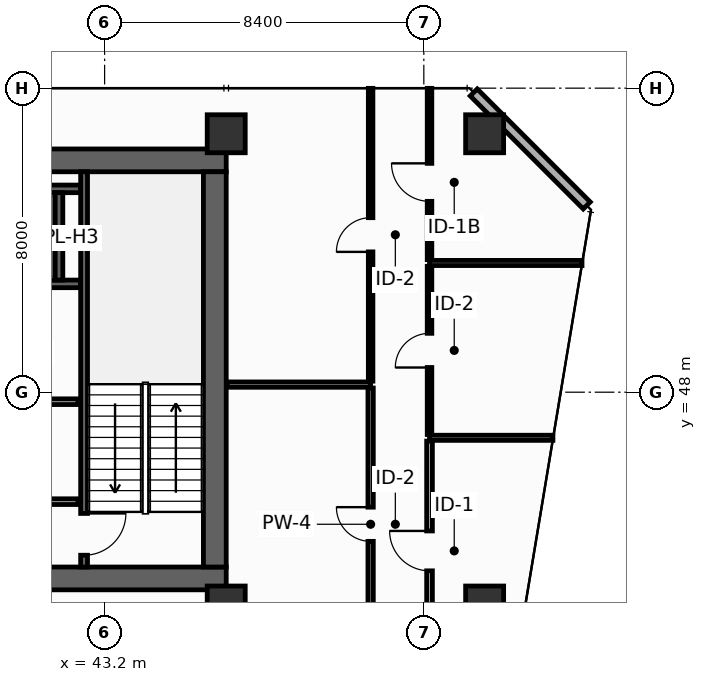
"""IFC4 building model, lengths in metres.
Left out: names, types, materials, properties, quantities, classifications, styles, units other than length and angle.
Written with IfcOpenShell. Run it as: python <this file> out.ifc"""

import sys

from ifc_helpers import new_model, si_unit, direction, frame, frame_2d, origin, origin_2d, place, context, subcontext, project, spatial, rectangle, hollow_rectangle, extrude, element, fill, save


model = new_model("IFC4")
c1 = context("Model", 3, precision=1e-05, world=origin(), true_north=direction((0.0, 1.0)))
c2 = subcontext(c1, "Body", "Model", "MODEL_VIEW")
j1 = project(units=[si_unit("LENGTHUNIT", "METRE"), si_unit("PLANEANGLEUNIT", "RADIAN")], contexts=[c1])
p1 = place(None, origin())
s1 = spatial("IfcSite", under=j1, at=p1, CompositionType="ELEMENT")
p2 = place(p1, origin())
s2 = spatial("IfcBuilding", under=s1, at=p2, CompositionType="ELEMENT")
p3 = place(p2, frame((0.0, 0.0, 119.2)))
s3 = spatial("IfcBuildingStorey", under=s2, at=p3, CompositionType="ELEMENT", Elevation=119.2)
p4 = place(p3, frame((13.5, 43.1, 0.0), z_axis=(0.0, 0.0, 1.0), x_axis=(1.0, 0.0, 0.0)))
e1 = element("IfcWall", 1, at=p4, inside=s3, PredefinedType="SHEAR", context=c2, shape_type="SweptSolid", body=[
    extrude(rectangle(XDim=32.9, YDim=0.6, at=frame_2d((16.45, 0.0))), origin(), (0.0, 0.0, 1.0), 3.95),
])
p5 = place(p4, frame((5.4, 0.0, 0.0)))
e2 = element("IfcOpeningElement", 2, at=p5, cuts=e1, PredefinedType="OPENING", context=c2, shape_type="SweptSolid", body=[
    extrude(rectangle(XDim=1.1, YDim=2.15, at=frame_2d((0.55, 1.075))), frame((0.0, 0.31, 0.0), z_axis=(0.0, -1.0, 0.0), x_axis=(1.0, 0.0, 0.0)), (0.0, 0.0, 1.0), 0.62),
])
p6 = place(p4, frame((25.6, 0.0, 0.0)))
e3 = element("IfcOpeningElement", 3, at=p6, cuts=e1, PredefinedType="OPENING", context=c2, shape_type="SweptSolid", body=[
    extrude(rectangle(XDim=1.1, YDim=2.15, at=frame_2d((0.55, 1.075))), frame((0.0, 0.31, 0.0), z_axis=(0.0, -1.0, 0.0), x_axis=(1.0, 0.0, 0.0)), (0.0, 0.0, 1.0), 0.62),
])
p7 = place(p3, frame((13.5, 54.1, 0.0), z_axis=(0.0, 0.0, 1.0), x_axis=(1.0, 0.0, 0.0)))
e4 = element("IfcWall", 4, at=p7, inside=s3, PredefinedType="SHEAR", context=c2, shape_type="SweptSolid", body=[
    extrude(rectangle(XDim=32.9, YDim=0.6, at=frame_2d((16.45, 0.0))), origin(), (0.0, 0.0, 1.0), 3.95),
])
p8 = place(p3, frame((46.1, 43.4, 0.0), z_axis=(0.0, 0.0, 1.0), x_axis=(0.0, 1.0, 0.0)))
e5 = element("IfcWall", 5, at=p8, inside=s3, PredefinedType="SHEAR", context=c2, shape_type="SweptSolid", body=[
    extrude(rectangle(XDim=10.4, YDim=0.6, at=frame_2d((5.2, 0.0))), origin(), (0.0, 0.0, 1.0), 3.95),
])
for number, where, z_axis, x_axis in (
    (6, (46.4, 54.8, 0.0), (0.0, 0.0, 1.0), (1.0, 0.0, 0.0)),
    (7, (53.2, 54.8, 0.0), (0.0, 0.0, 1.0), (1.0, 0.0, 0.0)),
    (8, (46.4, 42.4, 0.0), (0.0, 0.0, 1.0), (1.0, 0.0, 0.0)),
    (9, (53.2, 42.4, 0.0), (0.0, 0.0, 1.0), (1.0, 0.0, 0.0)),
):
    element("IfcColumn", number, at=place(p3, frame(where, z_axis=z_axis, x_axis=x_axis)), inside=s3, PredefinedType="COLUMN", context=c2, shape_type="SweptSolid", body=[
        extrude(hollow_rectangle(XDim=1.0, YDim=1.0, WallThickness=0.045, at=origin_2d()), origin(), (0.0, 0.0, 1.0), 4.4),
    ])
p9 = place(p3, frame((39.525, 50.85, 0.0), z_axis=(0.0, 0.0, 1.0), x_axis=(1.0, 0.0, 0.0)))
e10 = element("IfcWall", 10, at=p9, inside=s3, PredefinedType="SHEAR", context=c2, shape_type="SweptSolid", body=[
    extrude(rectangle(XDim=3.045, YDim=0.2, at=frame_2d((1.522, 0.0))), origin(), (0.0, 0.0, 1.0), 3.95),
])
p10 = place(p9, frame((0.825, 0.0, 0.0)))
e11 = element("IfcOpeningElement", 11, at=p10, cuts=e10, PredefinedType="OPENING", context=c2, shape_type="SweptSolid", body=[
    extrude(rectangle(XDim=1.1, YDim=2.2, at=frame_2d((0.55, 1.1))), frame((0.0, 0.11, 0.0), z_axis=(0.0, -1.0, 0.0), x_axis=(1.0, 0.0, 0.0)), (0.0, 0.0, 1.0), 0.22),
])
p11 = place(p3, frame((39.525, 53.35, 0.0), z_axis=(0.0, 0.0, 1.0), x_axis=(1.0, 0.0, 0.0)))
e12 = element("IfcWall", 12, at=p11, inside=s3, PredefinedType="SHEAR", context=c2, shape_type="SweptSolid", body=[
    extrude(rectangle(XDim=3.045, YDim=0.2, at=frame_2d((1.522, 0.0))), origin(), (0.0, 0.0, 1.0), 3.95),
])
p12 = place(p3, frame((42.0, 50.95, 0.0), z_axis=(0.0, 0.0, 1.0), x_axis=(0.0, 1.0, 0.0)))
e13 = element("IfcWall", 13, at=p12, inside=s3, PredefinedType="SHEAR", context=c2, shape_type="SweptSolid", body=[
    extrude(rectangle(XDim=2.3, YDim=0.2, at=frame_2d((1.15, 0.0))), origin(), (0.0, 0.0, 1.0), 3.95),
])
p13 = place(p3, frame((42.66, 53.8, 0.0), z_axis=(0.0, 0.0, 1.0), x_axis=(0.0, -1.0, 0.0)))
e14 = element("IfcWall", 14, at=p13, inside=s3, PredefinedType="SHEAR", context=c2, shape_type="SweptSolid", body=[
    extrude(rectangle(XDim=10.4, YDim=0.18, at=frame_2d((5.2, 0.0))), origin(), (0.0, 0.0, 1.0), 3.95),
])
p14 = place(p13, frame((8.99, 0.0, 0.0)))
e15 = element("IfcOpeningElement", 15, at=p14, cuts=e14, PredefinedType="OPENING", context=c2, shape_type="SweptSolid", body=[
    extrude(rectangle(XDim=1.1, YDim=2.15, at=frame_2d((0.55, 1.075))), frame((0.0, 0.1, 0.0), z_axis=(0.0, -1.0, 0.0), x_axis=(1.0, 0.0, 0.0)), (0.0, 0.0, 1.0), 0.2),
])
p15 = place(p3, frame((34.05, 45.12, 0.0), z_axis=(0.0, 0.0, 1.0), x_axis=(1.0, 0.0, 0.0)))
e16 = element("IfcWall", 16, at=p15, inside=s3, PredefinedType="PARTITIONING", context=c2, shape_type="SweptSolid", body=[
    extrude(rectangle(XDim=8.45, YDim=0.15, at=frame_2d((4.225, 0.0))), origin(), (0.0, 0.0, 1.0), 3.95),
])
p16 = place(p15, frame((3.6, 0.0, 0.0)))
e17 = element("IfcOpeningElement", 17, at=p16, cuts=e16, PredefinedType="OPENING", context=c2, shape_type="SweptSolid", body=[
    extrude(rectangle(XDim=0.95, YDim=2.15, at=frame_2d((0.475, 1.075))), frame((0.0, 0.085, 0.0), z_axis=(0.0, -1.0, 0.0), x_axis=(1.0, 0.0, 0.0)), (0.0, 0.0, 1.0), 0.17),
])
p17 = place(p3, frame((34.05, 47.75, 0.0), z_axis=(0.0, 0.0, 1.0), x_axis=(1.0, 0.0, 0.0)))
e18 = element("IfcWall", 18, at=p17, inside=s3, PredefinedType="PARTITIONING", context=c2, shape_type="SweptSolid", body=[
    extrude(rectangle(XDim=8.45, YDim=0.15, at=frame_2d((4.225, 0.0))), origin(), (0.0, 0.0, 1.0), 3.95),
])
p18 = place(p3, frame((55.887, 52.913, 0.0), z_axis=(0.0, 0.0, 1.0), x_axis=(-0.707106781187, 0.707106781187, 0.0)))
e19 = element("IfcWall", 19, at=p18, inside=s3, PredefinedType="STANDARD", context=c2, shape_type="SweptSolid", body=[
    extrude(rectangle(XDim=4.206, YDim=0.26, at=frame_2d((2.103, 0.0))), origin(), (0.0, 0.0, 1.0), 3.95),
])
p19 = place(p3, frame((46.15, 40.94, 0.0), z_axis=(0.0, 0.0, 1.0), x_axis=(0.0, 1.0, 0.0)))
e20 = element("IfcWall", 20, at=p19, inside=s3, PredefinedType="PARTITIONING", context=c2, shape_type="SweptSolid", body=[
    extrude(rectangle(XDim=1.84, YDim=0.14, at=frame_2d((0.92, 0.0))), origin(), (0.0, 0.0, 1.0), 3.95),
])
p20 = place(p3, frame((46.42, 48.2, 0.0), z_axis=(0.0, 0.0, 1.0), x_axis=(1.0, 0.0, 0.0)))
e21 = element("IfcWall", 21, at=p20, inside=s3, PredefinedType="PARTITIONING", context=c2, shape_type="SweptSolid", body=[
    extrude(rectangle(XDim=3.78, YDim=0.14, at=frame_2d((1.89, 0.0))), origin(), (0.0, 0.0, 1.0), 3.95),
])
p21 = place(p3, frame((50.2, 40.94, 0.0), z_axis=(0.0, 0.0, 1.0), x_axis=(0.0, 1.0, 0.0)))
e22 = element("IfcWall", 22, at=p21, inside=s3, PredefinedType="PARTITIONING", context=c2, shape_type="SweptSolid", body=[
    extrude(rectangle(XDim=7.17, YDim=0.14, at=frame_2d((3.585, 0.0))), origin(), (0.0, 0.0, 1.0), 3.135),
])
p22 = place(p21, frame((3.135, 0.0, 0.0)))
e23 = element("IfcOpeningElement", 23, at=p22, cuts=e22, PredefinedType="OPENING", context=c2, shape_type="SweptSolid", body=[
    extrude(rectangle(XDim=0.9, YDim=2.1, at=frame_2d((0.45, 1.05))), frame((0.0, 0.08, 0.0), z_axis=(0.0, -1.0, 0.0), x_axis=(1.0, 0.0, 0.0)), (0.0, 0.0, 1.0), 0.16),
])
p23 = place(p3, frame((50.2, 48.29, 0.0), z_axis=(0.0, 0.0, 1.0), x_axis=(0.0, 1.0, 0.0)))
e24 = element("IfcWall", 24, at=p23, inside=s3, PredefinedType="PARTITIONING", context=c2, shape_type="SweptSolid", body=[
    extrude(rectangle(XDim=7.705, YDim=0.12, at=frame_2d((3.853, 0.0))), origin(), (0.0, 0.0, 1.0), 3.235),
])
p24 = place(p23, frame((3.402, 0.0, 0.0)))
e25 = element("IfcOpeningElement", 25, at=p24, cuts=e24, PredefinedType="OPENING", context=c2, shape_type="SweptSolid", body=[
    extrude(rectangle(XDim=0.9, YDim=2.1, at=frame_2d((0.45, 1.05))), frame((0.0, 0.07, 0.0), z_axis=(0.0, -1.0, 0.0), x_axis=(1.0, 0.0, 0.0)), (0.0, 0.0, 1.0), 0.14),
])
p25 = place(p3, frame((51.75, 46.8, 0.0), z_axis=(0.0, 0.0, 1.0), x_axis=(1.0, 0.0, 0.0)))
e26 = element("IfcWall", 26, at=p25, inside=s3, PredefinedType="PARTITIONING", context=c2, shape_type="SweptSolid", body=[
    extrude(rectangle(XDim=3.247, YDim=0.135, at=frame_2d((1.624, 0.0))), origin(), (0.0, 0.0, 1.0), 3.135),
])
p26 = place(p3, frame((51.75, 51.4, 0.0), z_axis=(0.0, 0.0, 1.0), x_axis=(1.0, 0.0, 0.0)))
e27 = element("IfcWall", 27, at=p26, inside=s3, PredefinedType="PARTITIONING", context=c2, shape_type="SweptSolid", body=[
    extrude(rectangle(XDim=4.012, YDim=0.135, at=frame_2d((2.006, 0.0))), origin(), (0.0, 0.0, 1.0), 3.135),
])
p27 = place(p3, frame((51.75, 40.938, 0.0), z_axis=(0.0, 0.0, 1.0), x_axis=(0.0, 1.0, 0.0)))
e28 = element("IfcWall", 28, at=p27, inside=s3, PredefinedType="PARTITIONING", context=c2, shape_type="SweptSolid", body=[
    extrude(rectangle(XDim=5.775, YDim=0.15, at=frame_2d((2.887, 0.0))), origin(), (0.0, 0.0, 1.0), 3.135),
])
p28 = place(p27, frame((2.362, 0.0, 0.0)))
e29 = element("IfcOpeningElement", 29, at=p28, cuts=e28, PredefinedType="OPENING", context=c2, shape_type="SweptSolid", body=[
    extrude(rectangle(XDim=1.05, YDim=2.15, at=frame_2d((0.525, 1.075))), frame((0.0, 0.085, 0.0), z_axis=(0.0, -1.0, 0.0), x_axis=(1.0, 0.0, 0.0)), (0.0, 0.0, 1.0), 0.17),
])
p29 = place(p3, frame((51.75, 46.887, 0.0), z_axis=(0.0, 0.0, 1.0), x_axis=(0.0, 1.0, 0.0)))
e30 = element("IfcWall", 30, at=p29, inside=s3, PredefinedType="PARTITIONING", context=c2, shape_type="SweptSolid", body=[
    extrude(rectangle(XDim=4.425, YDim=0.12, at=frame_2d((2.212, 0.0))), origin(), (0.0, 0.0, 1.0), 3.95),
])
p30 = place(p29, frame((1.762, 0.0, 0.0)))
e31 = element("IfcOpeningElement", 31, at=p30, cuts=e30, PredefinedType="OPENING", context=c2, shape_type="SweptSolid", body=[
    extrude(rectangle(XDim=0.9, YDim=2.1, at=frame_2d((0.45, 1.05))), frame((0.0, 0.07, 0.0), z_axis=(0.0, -1.0, 0.0), x_axis=(1.0, 0.0, 0.0)), (0.0, 0.0, 1.0), 0.14),
])
p31 = place(p3, frame((51.75, 51.488, 0.0), z_axis=(0.0, 0.0, 1.0), x_axis=(0.0, 1.0, 0.0)))
e32 = element("IfcWall", 32, at=p31, inside=s3, PredefinedType="PARTITIONING", context=c2, shape_type="SweptSolid", body=[
    extrude(rectangle(XDim=4.508, YDim=0.12, at=frame_2d((2.254, 0.0))), origin(), (0.0, 0.0, 1.0), 3.235),
])
p32 = place(p31, frame((1.534, 0.0, 0.0)))
e33 = element("IfcOpeningElement", 33, at=p32, cuts=e32, PredefinedType="OPENING", context=c2, shape_type="SweptSolid", body=[
    extrude(rectangle(XDim=1.0, YDim=2.15, at=frame_2d((0.5, 1.075))), frame((0.0, 0.07, 0.0), z_axis=(0.0, -1.0, 0.0), x_axis=(1.0, 0.0, 0.0)), (0.0, 0.0, 1.0), 0.14),
])
p33 = place(p14, origin())
e34 = element("IfcDoor", 34, at=p33, inside=s3, OperationType="SINGLE_SWING_LEFT", PredefinedType="DOOR", context=c2, shape_type="SweptSolid", body=[
    extrude(rectangle(XDim=1.1, YDim=2.15, at=frame_2d((0.55, 1.075))), frame((0.0, 0.025, 0.0), z_axis=(0.0, -1.0, 0.0), x_axis=(1.0, 0.0, 0.0)), (0.0, 0.0, 1.0), 0.05),
])
fill(e15, e34)
p34 = place(p22, origin())
e35 = element("IfcDoor", 35, at=p34, inside=s3, OperationType="SINGLE_SWING_RIGHT", PredefinedType="DOOR", context=c2, shape_type="SweptSolid", body=[
    extrude(rectangle(XDim=0.9, YDim=2.1, at=frame_2d((0.45, 1.05))), frame((0.0, 0.025, 0.0), z_axis=(0.0, -1.0, 0.0), x_axis=(1.0, 0.0, 0.0)), (0.0, 0.0, 1.0), 0.05),
])
fill(e23, e35)
p35 = place(p24, origin())
e36 = element("IfcDoor", 36, at=p35, inside=s3, OperationType="SINGLE_SWING_LEFT", PredefinedType="DOOR", context=c2, shape_type="SweptSolid", body=[
    extrude(rectangle(XDim=0.9, YDim=2.1, at=frame_2d((0.45, 1.05))), frame((0.0, 0.025, 0.0), z_axis=(0.0, -1.0, 0.0), x_axis=(1.0, 0.0, 0.0)), (0.0, 0.0, 1.0), 0.05),
])
fill(e25, e36)
p36 = place(p28, origin())
e37 = element("IfcDoor", 37, at=p36, inside=s3, OperationType="SINGLE_SWING_RIGHT", PredefinedType="DOOR", context=c2, shape_type="SweptSolid", body=[
    extrude(rectangle(XDim=1.05, YDim=2.15, at=frame_2d((0.525, 1.075))), frame((0.0, 0.025, 0.0), z_axis=(0.0, -1.0, 0.0), x_axis=(1.0, 0.0, 0.0)), (0.0, 0.0, 1.0), 0.05),
])
fill(e29, e37)
p37 = place(p30, origin())
e38 = element("IfcDoor", 38, at=p37, inside=s3, OperationType="SINGLE_SWING_LEFT", PredefinedType="DOOR", context=c2, shape_type="SweptSolid", body=[
    extrude(rectangle(XDim=0.9, YDim=2.1, at=frame_2d((0.45, 1.05))), frame((0.0, 0.025, 0.0), z_axis=(0.0, -1.0, 0.0), x_axis=(1.0, 0.0, 0.0)), (0.0, 0.0, 1.0), 0.05),
])
fill(e31, e38)
p38 = place(p32, origin())
e39 = element("IfcDoor", 39, at=p38, inside=s3, OperationType="SINGLE_SWING_RIGHT", PredefinedType="DOOR", context=c2, shape_type="SweptSolid", body=[
    extrude(rectangle(XDim=1.0, YDim=2.15, at=frame_2d((0.5, 1.075))), frame((0.0, 0.025, 0.0), z_axis=(0.0, -1.0, 0.0), x_axis=(1.0, 0.0, 0.0)), (0.0, 0.0, 1.0), 0.05),
])
fill(e33, e39)
save(model, sys.argv[1])
